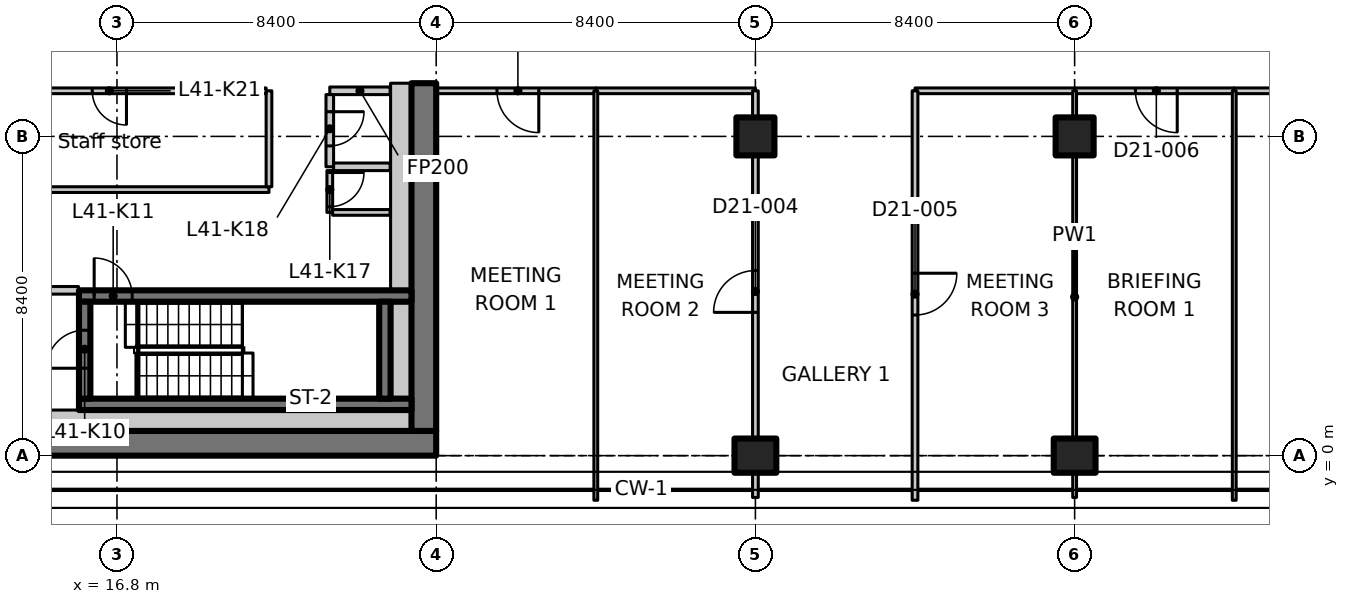
"""IFC4 building model, lengths in metres.
Left out: names, types, materials, properties, quantities, classifications, styles, units other than length and angle.
Written with IfcOpenShell. Run it as: python <this file> out.ifc"""

import sys

from ifc_helpers import new_model, si_unit, direction, frame, frame_2d, origin, origin_2d, place, context, subcontext, project, spatial, polyline, rectangle, outline, extrude, element, fill, save


model = new_model("IFC4")
c1 = context("Model", 3, precision=1e-05, world=origin(), true_north=direction((0.0, 1.0)))
c2 = subcontext(c1, "Body", "Model", "MODEL_VIEW")
j1 = project(units=[si_unit("LENGTHUNIT", "METRE"), si_unit("PLANEANGLEUNIT", "RADIAN")], contexts=[c1])
p1 = place(None, origin())
s1 = spatial("IfcSite", under=j1, at=p1, CompositionType="ELEMENT")
p2 = place(p1, origin())
s2 = spatial("IfcBuilding", under=s1, at=p2, CompositionType="ELEMENT")
p3 = place(p2, frame((0.0, 0.0, 166.8)))
s3 = spatial("IfcBuildingStorey", under=s2, at=p3, CompositionType="ELEMENT", Elevation=166.8)
p4 = place(p3, frame((33.6, 0.0, 0.0), z_axis=(0.0, 0.0, 1.0), x_axis=(0.0, 1.0, 0.0)))
e1 = element("IfcColumn", 1, at=p4, inside=s3, PredefinedType="COLUMN", context=c2, shape_type="SweptSolid", body=[
    extrude(rectangle(XDim=0.9, YDim=1.1, at=origin_2d()), origin(), (0.0, 0.0, 1.0), 3.35),
])
p5 = place(p3, frame((33.6, 8.4, 0.0), z_axis=(0.0, 0.0, 1.0), x_axis=(1.0, 0.0, 0.0)))
e2 = element("IfcColumn", 2, at=p5, inside=s3, PredefinedType="COLUMN", context=c2, shape_type="SweptSolid", body=[
    extrude(rectangle(XDim=1.0, YDim=1.0, at=origin_2d()), origin(), (0.0, 0.0, 1.0), 3.35),
])
p6 = place(p3, frame((42.0, 0.0, 0.0), z_axis=(0.0, 0.0, 1.0), x_axis=(0.0, 1.0, 0.0)))
e3 = element("IfcColumn", 3, at=p6, inside=s3, PredefinedType="COLUMN", context=c2, shape_type="SweptSolid", body=[
    extrude(rectangle(XDim=0.9, YDim=1.1, at=origin_2d()), origin(), (0.0, 0.0, 1.0), 3.35),
])
p7 = place(p3, frame((42.0, 8.4, 0.0), z_axis=(0.0, 0.0, 1.0), x_axis=(1.0, 0.0, 0.0)))
e4 = element("IfcColumn", 4, at=p7, inside=s3, PredefinedType="COLUMN", context=c2, shape_type="SweptSolid", body=[
    extrude(rectangle(XDim=1.0, YDim=1.0, at=origin_2d()), origin(), (0.0, 0.0, 1.0), 3.35),
])
p8 = place(p3, frame((7.286, 0.325, 0.0), z_axis=(0.0, 0.0, 1.0), x_axis=(1.0, 0.0, 0.0)))
e5 = element("IfcWall", 5, at=p8, inside=s3, PredefinedType="SHEAR", context=c2, shape_type="SweptSolid", body=[
    extrude(rectangle(XDim=17.914, YDim=0.65, at=frame_2d((8.957, 0.0))), origin(), (0.0, 0.0, 1.0), 3.35),
])
p9 = place(p3, frame((24.875, 0.65, 0.0), z_axis=(0.0, 0.0, 1.0), x_axis=(0.0, 1.0, 0.0)))
e6 = element("IfcWall", 6, at=p9, inside=s3, PredefinedType="SHEAR", context=c2, shape_type="SweptSolid", body=[
    extrude(rectangle(XDim=9.15, YDim=0.65, at=frame_2d((4.575, 0.0))), origin(), (0.0, 0.0, 1.0), 3.35),
])
p10 = place(p3, frame((15.8, 1.35, 0.0), z_axis=(0.0, 0.0, 1.0), x_axis=(1.0, 0.0, 0.0)))
e7 = element("IfcWall", 7, at=p10, inside=s3, PredefinedType="SHEAR", context=c2, shape_type="SweptSolid", body=[
    extrude(rectangle(XDim=8.75, YDim=0.3, at=frame_2d((4.375, 0.0))), origin(), (0.0, 0.0, 1.0), 3.35),
])
p11 = place(p3, frame((15.8, 4.2, 0.0), z_axis=(0.0, 0.0, 1.0), x_axis=(1.0, 0.0, 0.0)))
e8 = element("IfcWall", 8, at=p11, inside=s3, PredefinedType="SHEAR", context=c2, shape_type="SweptSolid", body=[
    extrude(rectangle(XDim=8.75, YDim=0.3, at=frame_2d((4.375, 0.0))), origin(), (0.0, 0.0, 1.0), 3.35),
])
p12 = place(p11, frame((0.4, 0.0, 0.0)))
e9 = element("IfcOpeningElement", 9, at=p12, cuts=e8, PredefinedType="OPENING", context=c2, shape_type="SweptSolid", body=[
    extrude(rectangle(XDim=1.0, YDim=2.1, at=frame_2d((0.5, 1.05))), frame((0.0, 0.16, 0.0), z_axis=(0.0, -1.0, 0.0), x_axis=(1.0, 0.0, 0.0)), (0.0, 0.0, 1.0), 0.32),
])
p13 = place(p3, frame((15.95, 1.5, 0.0), z_axis=(0.0, 0.0, 1.0), x_axis=(0.0, 1.0, 0.0)))
e10 = element("IfcWall", 10, at=p13, inside=s3, PredefinedType="SHEAR", context=c2, shape_type="SweptSolid", body=[
    extrude(rectangle(XDim=2.55, YDim=0.3, at=frame_2d((1.275, 0.0))), origin(), (0.0, 0.0, 1.0), 3.35),
])
p14 = place(p13, frame((0.8, 0.0, 0.0)))
e11 = element("IfcOpeningElement", 11, at=p14, cuts=e10, PredefinedType="OPENING", context=c2, shape_type="SweptSolid", body=[
    extrude(rectangle(XDim=1.0, YDim=2.1, at=frame_2d((0.5, 1.05))), frame((0.0, 0.16, 0.0), z_axis=(0.0, -1.0, 0.0), x_axis=(1.0, 0.0, 0.0)), (0.0, 0.0, 1.0), 0.32),
])
p15 = place(p3, frame((23.85, 1.5, 0.0), z_axis=(0.0, 0.0, 1.0), x_axis=(0.0, 1.0, 0.0)))
e12 = element("IfcWall", 12, at=p15, inside=s3, PredefinedType="SHEAR", context=c2, shape_type="SweptSolid", body=[
    extrude(rectangle(XDim=2.55, YDim=0.3, at=frame_2d((1.275, 0.0))), origin(), (0.0, 0.0, 1.0), 3.35),
])
p16 = place(p3, frame((13.362, 4.35, 0.0), z_axis=(0.0, 0.0, 1.0), x_axis=(1.0, 0.0, 0.0)))
e13 = element("IfcWall", 13, at=p16, inside=s3, PredefinedType="PARTITIONING", context=c2, shape_type="SweptSolid", body=[
    extrude(rectangle(XDim=2.426, YDim=0.2, at=frame_2d((1.213, 0.0))), origin(), (0.0, 0.0, 1.0), 3.35),
])
p17 = place(p16, frame((0.638, 0.0, 0.0)))
e14 = element("IfcOpeningElement", 14, at=p17, cuts=e13, PredefinedType="OPENING", context=c2, shape_type="SweptSolid", body=[
    extrude(rectangle(XDim=1.0, YDim=2.1, at=frame_2d((0.5, 1.05))), frame((0.0, 0.11, 0.0), z_axis=(0.0, -1.0, 0.0), x_axis=(1.0, 0.0, 0.0)), (0.0, 0.0, 1.0), 0.22),
])
p18 = place(p3, frame((23.988, 9.6, 0.0), z_axis=(0.0, 0.0, 1.0), x_axis=(-1.0, 0.0, 0.0)))
e15 = element("IfcWall", 15, at=p18, inside=s3, PredefinedType="PARTITIONING", context=c2, shape_type="SweptSolid", body=[
    extrude(rectangle(XDim=1.588, YDim=0.2, at=frame_2d((0.794, 0.0))), origin(), (0.0, 0.0, 1.0), 3.35),
])
p19 = place(p3, frame((22.4, 9.5, 0.0), z_axis=(0.0, 0.0, 1.0), x_axis=(0.0, -1.0, 0.0)))
e16 = element("IfcWall", 16, at=p19, inside=s3, PredefinedType="PARTITIONING", context=c2, shape_type="SweptSolid", body=[
    extrude(rectangle(XDim=1.9, YDim=0.2, at=frame_2d((0.95, 0.0))), origin(), (0.0, 0.0, 1.0), 3.35),
])
p20 = place(p19, frame((0.45, 0.0, 0.0)))
e17 = element("IfcOpeningElement", 17, at=p20, cuts=e16, PredefinedType="OPENING", context=c2, shape_type="SweptSolid", body=[
    extrude(rectangle(XDim=0.9, YDim=2.1, at=frame_2d((0.45, 1.05))), frame((0.0, 0.11, 0.0), z_axis=(0.0, -1.0, 0.0), x_axis=(1.0, 0.0, 0.0)), (0.0, 0.0, 1.0), 0.22),
])
p21 = place(p3, frame((22.5, 7.6, 0.0), z_axis=(0.0, 0.0, 1.0), x_axis=(1.0, 0.0, 0.0)))
e18 = element("IfcWall", 18, at=p21, inside=s3, PredefinedType="PARTITIONING", context=c2, shape_type="SweptSolid", body=[
    extrude(rectangle(XDim=1.488, YDim=0.2, at=frame_2d((0.744, 0.0))), origin(), (0.0, 0.0, 1.0), 3.35),
])
p22 = place(p3, frame((12.5, 7.0, 0.0), z_axis=(0.0, 0.0, 1.0), x_axis=(1.0, 0.0, 0.0)))
e19 = element("IfcWall", 19, at=p22, inside=s3, PredefinedType="PARTITIONING", context=c2, shape_type="SweptSolid", body=[
    extrude(rectangle(XDim=8.3, YDim=0.15, at=frame_2d((4.15, 0.0))), origin(), (0.0, 0.0, 1.0), 3.35),
])
p23 = place(p3, frame((20.8, 7.075, 0.0), z_axis=(0.0, 0.0, 1.0), x_axis=(0.0, 1.0, 0.0)))
e20 = element("IfcWall", 20, at=p23, inside=s3, PredefinedType="PARTITIONING", context=c2, shape_type="SweptSolid", body=[
    extrude(rectangle(XDim=2.525, YDim=0.15, at=frame_2d((1.263, 0.0))), origin(), (0.0, 0.0, 1.0), 3.35),
])
p24 = place(p3, frame((20.725, 9.6, 0.0), z_axis=(0.0, 0.0, 1.0), x_axis=(-1.0, 0.0, 0.0)))
e21 = element("IfcWall", 21, at=p24, inside=s3, PredefinedType="PARTITIONING", context=c2, shape_type="SweptSolid", body=[
    extrude(rectangle(XDim=8.225, YDim=0.15, at=frame_2d((4.113, 0.0))), origin(), (0.0, 0.0, 1.0), 3.35),
])
p25 = place(p24, frame((3.675, 0.0, 0.0)))
e22 = element("IfcOpeningElement", 22, at=p25, cuts=e21, PredefinedType="OPENING", context=c2, shape_type="SweptSolid", body=[
    extrude(rectangle(XDim=0.9, YDim=2.1, at=frame_2d((0.45, 1.05))), frame((0.0, 0.085, 0.0), z_axis=(0.0, -1.0, 0.0), x_axis=(1.0, 0.0, 0.0)), (0.0, 0.0, 1.0), 0.17),
])
p26 = place(p3, frame((22.4, 7.5, 0.0), z_axis=(0.0, 0.0, 1.0), x_axis=(0.0, -1.0, 0.0)))
e23 = element("IfcWall", 23, at=p26, inside=s3, PredefinedType="PARTITIONING", context=c2, shape_type="SweptSolid", body=[
    extrude(rectangle(XDim=1.1, YDim=0.15, at=frame_2d((0.55, 0.0))), origin(), (0.0, 0.0, 1.0), 3.35),
])
p27 = place(p26, frame((0.05, 0.0, 0.0)))
e24 = element("IfcOpeningElement", 24, at=p27, cuts=e23, PredefinedType="OPENING", context=c2, shape_type="SweptSolid", body=[
    extrude(rectangle(XDim=0.9, YDim=2.1, at=frame_2d((0.45, 1.05))), frame((0.0, 0.085, 0.0), z_axis=(0.0, -1.0, 0.0), x_axis=(1.0, 0.0, 0.0)), (0.0, 0.0, 1.0), 0.17),
])
p28 = place(p3, frame((22.475, 6.4, 0.0), z_axis=(0.0, 0.0, 1.0), x_axis=(1.0, 0.0, 0.0)))
e25 = element("IfcWall", 25, at=p28, inside=s3, PredefinedType="PARTITIONING", context=c2, shape_type="SweptSolid", body=[
    extrude(rectangle(XDim=1.513, YDim=0.15, at=frame_2d((0.756, 0.0))), origin(), (0.0, 0.0, 1.0), 3.35),
])
p29 = place(p3, frame((13.35, 0.925, 0.0), z_axis=(0.0, 0.0, 1.0), x_axis=(1.0, 0.0, 0.0)))
e26 = element("IfcWall", 26, at=p29, inside=s3, PredefinedType="PARTITIONING", context=c2, shape_type="SweptSolid", body=[
    extrude(rectangle(XDim=11.2, YDim=0.55, at=frame_2d((5.6, 0.0))), origin(), (0.0, 0.0, 1.0), 3.35),
])
p30 = place(p3, frame((24.275, 1.5, 0.0), z_axis=(0.0, 0.0, 1.0), x_axis=(0.0, 1.0, 0.0)))
e27 = element("IfcWall", 27, at=p30, inside=s3, PredefinedType="PARTITIONING", context=c2, shape_type="SweptSolid", body=[
    extrude(rectangle(XDim=2.55, YDim=0.55, at=frame_2d((1.275, 0.0))), origin(), (0.0, 0.0, 1.0), 3.35),
])
p31 = place(p3, frame((24.275, 4.35, 0.0), z_axis=(0.0, 0.0, 1.0), x_axis=(0.0, 1.0, 0.0)))
e28 = element("IfcWall", 28, at=p31, inside=s3, PredefinedType="PARTITIONING", context=c2, shape_type="SweptSolid", body=[
    extrude(rectangle(XDim=5.45, YDim=0.55, at=frame_2d((2.725, 0.0))), origin(), (0.0, 0.0, 1.0), 3.35),
])
p32 = place(p3, frame((29.4, 9.6, 0.0), z_axis=(0.0, 0.0, 1.0), x_axis=(-1.0, 0.0, 0.0)))
e29 = element("IfcWall", 29, at=p32, inside=s3, PredefinedType="PARTITIONING", context=c2, shape_type="SweptSolid", body=[
    extrude(rectangle(XDim=4.2, YDim=0.15, at=frame_2d((2.1, 0.0))), origin(), (0.0, 0.0, 1.0), 3.33),
])
p33 = place(p32, frame((1.5, 0.0, 0.0)))
e30 = element("IfcOpeningElement", 30, at=p33, cuts=e29, PredefinedType="OPENING", context=c2, shape_type="SweptSolid", body=[
    extrude(rectangle(XDim=1.1, YDim=2.1, at=frame_2d((0.55, 1.05))), frame((0.0, 0.085, 0.0), z_axis=(0.0, -1.0, 0.0), x_axis=(1.0, 0.0, 0.0)), (0.0, 0.0, 1.0), 0.17),
])
p34 = place(p3, frame((33.6, 9.6, 0.0), z_axis=(0.0, 0.0, 1.0), x_axis=(-1.0, 0.0, 0.0)))
e31 = element("IfcWall", 31, at=p34, inside=s3, PredefinedType="PARTITIONING", context=c2, shape_type="SweptSolid", body=[
    extrude(rectangle(XDim=4.2, YDim=0.15, at=frame_2d((2.1, 0.0))), origin(), (0.0, 0.0, 1.0), 3.33),
])
p35 = place(p3, frame((42.0, 9.6, 0.0), z_axis=(0.0, 0.0, 1.0), x_axis=(-1.0, 0.0, 0.0)))
e32 = element("IfcWall", 32, at=p35, inside=s3, PredefinedType="PARTITIONING", context=c2, shape_type="SweptSolid", body=[
    extrude(rectangle(XDim=4.2, YDim=0.15, at=frame_2d((2.1, 0.0))), origin(), (0.0, 0.0, 1.0), 3.33),
])
p36 = place(p3, frame((46.2, 9.6, 0.0), z_axis=(0.0, 0.0, 1.0), x_axis=(-1.0, 0.0, 0.0)))
e33 = element("IfcWall", 33, at=p36, inside=s3, PredefinedType="PARTITIONING", context=c2, shape_type="SweptSolid", body=[
    extrude(rectangle(XDim=4.2, YDim=0.15, at=frame_2d((2.1, 0.0))), origin(), (0.0, 0.0, 1.0), 3.33),
])
p37 = place(p36, frame((1.5, 0.0, 0.0)))
e34 = element("IfcOpeningElement", 34, at=p37, cuts=e33, PredefinedType="OPENING", context=c2, shape_type="SweptSolid", body=[
    extrude(rectangle(XDim=1.1, YDim=2.1, at=frame_2d((0.55, 1.05))), frame((0.0, 0.085, 0.0), z_axis=(0.0, -1.0, 0.0), x_axis=(1.0, 0.0, 0.0)), (0.0, 0.0, 1.0), 0.17),
])
p38 = place(p3, frame((54.6, 9.6, 0.0), z_axis=(0.0, 0.0, 1.0), x_axis=(-1.0, 0.0, 0.0)))
e35 = element("IfcWall", 35, at=p38, inside=s3, PredefinedType="PARTITIONING", context=c2, shape_type="SweptSolid", body=[
    extrude(rectangle(XDim=8.4, YDim=0.15, at=frame_2d((4.2, 0.0))), origin(), (0.0, 0.0, 1.0), 3.33),
])
p39 = place(p38, frame((4.8, 0.0, 0.0)))
e36 = element("IfcOpeningElement", 36, at=p39, cuts=e35, PredefinedType="OPENING", context=c2, shape_type="SweptSolid", body=[
    extrude(rectangle(XDim=1.6, YDim=2.1, at=frame_2d((0.8, 1.05))), frame((0.0, 0.085, 0.0), z_axis=(0.0, -1.0, 0.0), x_axis=(1.0, 0.0, 0.0)), (0.0, 0.0, 1.0), 0.17),
])
p40 = place(p3, frame((33.6, -1.1, 0.0), z_axis=(0.0, 0.0, 1.0), x_axis=(0.0, 1.0, 0.0)))
e37 = element("IfcWall", 37, at=p40, inside=s3, PredefinedType="PARTITIONING", context=c2, shape_type="SweptSolid", body=[
    extrude(rectangle(XDim=0.63, YDim=0.15, at=frame_2d((0.315, 0.0))), origin(), (0.0, 0.0, 1.0), 3.33),
])
p41 = place(p3, frame((33.6, 0.47, 0.0), z_axis=(0.0, 0.0, 1.0), x_axis=(0.0, 1.0, 0.0)))
e38 = element("IfcWall", 38, at=p41, inside=s3, PredefinedType="PARTITIONING", context=c2, shape_type="SweptSolid", body=[
    extrude(rectangle(XDim=7.41, YDim=0.15, at=frame_2d((3.705, 0.0))), origin(), (0.0, 0.0, 1.0), 3.33),
])
p42 = place(p41, frame((3.3, 0.0, 0.0)))
e39 = element("IfcOpeningElement", 39, at=p42, cuts=e38, PredefinedType="OPENING", context=c2, shape_type="SweptSolid", body=[
    extrude(rectangle(XDim=1.1, YDim=2.1, at=frame_2d((0.55, 1.05))), frame((0.0, 0.085, 0.0), z_axis=(0.0, -1.0, 0.0), x_axis=(1.0, 0.0, 0.0)), (0.0, 0.0, 1.0), 0.17),
])
p43 = place(p3, frame((33.6, 8.92, 0.0), z_axis=(0.0, 0.0, 1.0), x_axis=(0.0, 1.0, 0.0)))
e40 = element("IfcWall", 40, at=p43, inside=s3, PredefinedType="PARTITIONING", context=c2, shape_type="SweptSolid", body=[
    extrude(rectangle(XDim=0.68, YDim=0.15, at=frame_2d((0.34, 0.0))), origin(), (0.0, 0.0, 1.0), 3.33),
])
p44 = place(p3, frame((37.8, 9.6, 0.0), z_axis=(0.0, 0.0, 1.0), x_axis=(0.0, -1.0, 0.0)))
e41 = element("IfcWall", 41, at=p44, inside=s3, PredefinedType="PARTITIONING", context=c2, shape_type="SweptSolid", body=[
    extrude(outline(polyline([(0.0, 0.0), (10.774, 0.0), (10.774, 3.33), (10.7, 3.33), (10.05, 3.33), (10.048, 2.98), (9.152, 2.98), (9.15, 3.33), (0.0, 3.33), (0.0, 0.0)])), frame((0.0, 0.075, 0.0), z_axis=(0.0, -1.0, 0.0), x_axis=(1.0, 0.0, 0.0)), (0.0, 0.0, 1.0), 0.15),
])
p45 = place(p44, frame((4.8, 0.0, 0.0)))
e42 = element("IfcOpeningElement", 42, at=p45, cuts=e41, PredefinedType="OPENING", context=c2, shape_type="SweptSolid", body=[
    extrude(rectangle(XDim=1.1, YDim=2.1, at=frame_2d((0.55, 1.05))), frame((0.0, 0.085, 0.0), z_axis=(0.0, -1.0, 0.0), x_axis=(1.0, 0.0, 0.0)), (0.0, 0.0, 1.0), 0.17),
])
p46 = place(p3, frame((29.4, 9.6, 0.0), z_axis=(0.0, 0.0, 1.0), x_axis=(0.0, -1.0, 0.0)))
e43 = element("IfcWall", 43, at=p46, inside=s3, PredefinedType="PARTITIONING", context=c2, shape_type="SweptSolid", body=[
    extrude(outline(polyline([(0.0, 0.0), (10.774, 0.0), (10.774, 3.33), (10.7, 3.33), (10.05, 3.33), (10.048, 2.98), (9.152, 2.98), (9.15, 3.33), (0.0, 3.33), (0.0, 0.0)])), frame((0.0, 0.05, 0.0), z_axis=(0.0, -1.0, 0.0), x_axis=(1.0, 0.0, 0.0)), (0.0, 0.0, 1.0), 0.1),
])
p47 = place(p3, frame((42.0, 9.6, 0.0), z_axis=(0.0, 0.0, 1.0), x_axis=(0.0, -1.0, 0.0)))
e44 = element("IfcWall", 44, at=p47, inside=s3, PredefinedType="PARTITIONING", context=c2, shape_type="SweptSolid", body=[
    extrude(rectangle(XDim=0.68, YDim=0.1, at=frame_2d((0.34, 0.0))), origin(), (0.0, 0.0, 1.0), 3.33),
])
p48 = place(p3, frame((42.0, 7.88, 0.0), z_axis=(0.0, 0.0, 1.0), x_axis=(0.0, -1.0, 0.0)))
e45 = element("IfcWall", 45, at=p48, inside=s3, PredefinedType="PARTITIONING", context=c2, shape_type="SweptSolid", body=[
    extrude(rectangle(XDim=7.41, YDim=0.1, at=frame_2d((3.705, 0.0))), origin(), (0.0, 0.0, 1.0), 3.33),
])
p49 = place(p3, frame((42.0, -0.47, 0.0), z_axis=(0.0, 0.0, 1.0), x_axis=(0.0, -1.0, 0.0)))
e46 = element("IfcWall", 46, at=p49, inside=s3, PredefinedType="PARTITIONING", context=c2, shape_type="SweptSolid", body=[
    extrude(rectangle(XDim=0.63, YDim=0.1, at=frame_2d((0.315, 0.0))), origin(), (0.0, 0.0, 1.0), 3.33),
])
p50 = place(p3, frame((46.2, 9.6, 0.0), z_axis=(0.0, 0.0, 1.0), x_axis=(0.0, -1.0, 0.0)))
e47 = element("IfcWall", 47, at=p50, inside=s3, PredefinedType="PARTITIONING", context=c2, shape_type="SweptSolid", body=[
    extrude(outline(polyline([(0.0, 0.0), (10.774, 0.0), (10.774, 3.33), (10.7, 3.33), (10.05, 3.33), (10.048, 2.98), (9.152, 2.98), (9.15, 3.33), (0.0, 3.33), (0.0, 0.0)])), frame((0.0, 0.05, 0.0), z_axis=(0.0, -1.0, 0.0), x_axis=(1.0, 0.0, 0.0)), (0.0, 0.0, 1.0), 0.1),
])
p51 = place(p14, origin())
e48 = element("IfcDoor", 48, at=p51, inside=s3, OperationType="SINGLE_SWING_RIGHT", PredefinedType="DOOR", context=c2, shape_type="SweptSolid", body=[
    extrude(rectangle(XDim=1.0, YDim=2.1, at=frame_2d((0.5, 1.05))), frame((0.0, 0.025, 0.0), z_axis=(0.0, -1.0, 0.0), x_axis=(1.0, 0.0, 0.0)), (0.0, 0.0, 1.0), 0.05),
])
fill(e11, e48)
p52 = place(p12, origin())
e49 = element("IfcDoor", 49, at=p52, inside=s3, OperationType="SINGLE_SWING_LEFT", PredefinedType="DOOR", context=c2, shape_type="SweptSolid", body=[
    extrude(rectangle(XDim=1.0, YDim=2.1, at=frame_2d((0.5, 1.05))), frame((0.0, 0.025, 0.0), z_axis=(0.0, -1.0, 0.0), x_axis=(1.0, 0.0, 0.0)), (0.0, 0.0, 1.0), 0.05),
])
fill(e9, e49)
p53 = place(p27, origin())
e50 = element("IfcDoor", 50, at=p53, inside=s3, OperationType="SINGLE_SWING_LEFT", PredefinedType="DOOR", context=c2, shape_type="SweptSolid", body=[
    extrude(rectangle(XDim=0.9, YDim=2.1, at=frame_2d((0.45, 1.05))), frame((0.0, 0.025, 0.0), z_axis=(0.0, -1.0, 0.0), x_axis=(1.0, 0.0, 0.0)), (0.0, 0.0, 1.0), 0.05),
])
fill(e24, e50)
p54 = place(p20, origin())
e51 = element("IfcDoor", 51, at=p54, inside=s3, OperationType="SINGLE_SWING_RIGHT", PredefinedType="DOOR", context=c2, shape_type="SweptSolid", body=[
    extrude(rectangle(XDim=0.9, YDim=2.1, at=frame_2d((0.45, 1.05))), frame((0.0, 0.025, 0.0), z_axis=(0.0, -1.0, 0.0), x_axis=(1.0, 0.0, 0.0)), (0.0, 0.0, 1.0), 0.05),
])
fill(e17, e51)
p55 = place(p25, origin())
e52 = element("IfcDoor", 52, at=p55, inside=s3, OperationType="SINGLE_SWING_LEFT", PredefinedType="DOOR", context=c2, shape_type="SweptSolid", body=[
    extrude(rectangle(XDim=0.9, YDim=2.1, at=frame_2d((0.45, 1.05))), frame((0.0, 0.025, 0.0), z_axis=(0.0, -1.0, 0.0), x_axis=(1.0, 0.0, 0.0)), (0.0, 0.0, 1.0), 0.05),
])
fill(e22, e52)
p56 = place(p33, origin())
e53 = element("IfcDoor", 53, at=p56, inside=s3, OperationType="SINGLE_SWING_LEFT", PredefinedType="DOOR", context=c2, shape_type="SweptSolid", body=[
    extrude(rectangle(XDim=1.1, YDim=2.1, at=frame_2d((0.55, 1.05))), frame((0.0, 0.025, 0.0), z_axis=(0.0, -1.0, 0.0), x_axis=(1.0, 0.0, 0.0)), (0.0, 0.0, 1.0), 0.05),
])
fill(e30, e53)
p57 = place(p42, origin())
e54 = element("IfcDoor", 54, at=p57, inside=s3, OperationType="SINGLE_SWING_LEFT", PredefinedType="DOOR", context=c2, shape_type="SweptSolid", body=[
    extrude(rectangle(XDim=1.1, YDim=2.1, at=frame_2d((0.55, 1.05))), frame((0.0, 0.025, 0.0), z_axis=(0.0, -1.0, 0.0), x_axis=(1.0, 0.0, 0.0)), (0.0, 0.0, 1.0), 0.05),
])
fill(e39, e54)
p58 = place(p45, origin())
e55 = element("IfcDoor", 55, at=p58, inside=s3, OperationType="SINGLE_SWING_LEFT", PredefinedType="DOOR", context=c2, shape_type="SweptSolid", body=[
    extrude(rectangle(XDim=1.1, YDim=2.1, at=frame_2d((0.55, 1.05))), frame((0.0, 0.025, 0.0), z_axis=(0.0, -1.0, 0.0), x_axis=(1.0, 0.0, 0.0)), (0.0, 0.0, 1.0), 0.05),
])
fill(e42, e55)
p59 = place(p37, origin())
e56 = element("IfcDoor", 56, at=p59, inside=s3, OperationType="SINGLE_SWING_LEFT", PredefinedType="DOOR", context=c2, shape_type="SweptSolid", body=[
    extrude(rectangle(XDim=1.1, YDim=2.1, at=frame_2d((0.55, 1.05))), frame((0.0, 0.025, 0.0), z_axis=(0.0, -1.0, 0.0), x_axis=(1.0, 0.0, 0.0)), (0.0, 0.0, 1.0), 0.05),
])
fill(e34, e56)
save(model, sys.argv[1])
